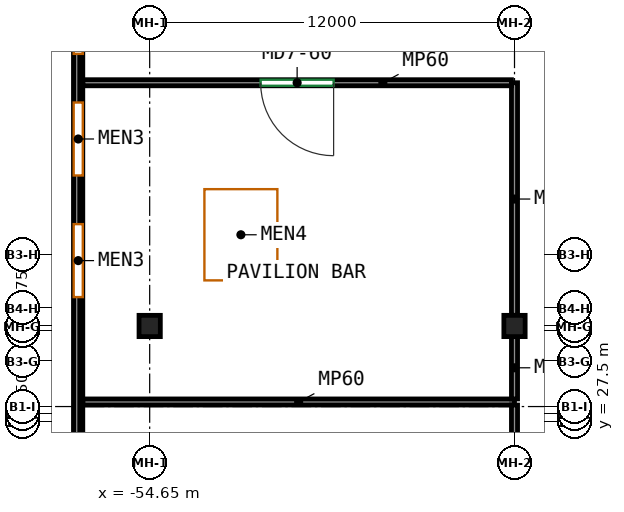
"""IFC4 building model, lengths in metres.
Left out: names, types, materials, properties, quantities, classifications, styles, units other than length and angle.
Written with IfcOpenShell. Run it as: python <this file> out.ifc"""

import sys

from ifc_helpers import new_model, si_unit, direction, frame, frame_2d, origin, origin_2d, place, context, subcontext, project, spatial, rectangle, extrude, source, transform, mapped, element, fill, save


model = new_model("IFC4")
c1 = context("Model", 3, precision=1e-05, world=origin(), true_north=direction((0.0, 1.0)))
c2 = subcontext(c1, "Body", "Model", "MODEL_VIEW")
j1 = project(units=[si_unit("LENGTHUNIT", "METRE"), si_unit("PLANEANGLEUNIT", "RADIAN")], contexts=[c1])
p1 = place(None, origin())
s1 = spatial("IfcSite", under=j1, at=p1, CompositionType="ELEMENT")
p2 = place(p1, origin())
s2 = spatial("IfcBuilding", under=s1, at=p2, CompositionType="ELEMENT")
p3 = place(p2, frame((0.0, 0.0, 22.5)))
s3 = spatial("IfcBuildingStorey", under=s2, at=p3, CompositionType="ELEMENT", Elevation=22.5)
m1 = source(origin(), c2, "Body", "SweptSolid", [
    extrude(rectangle(XDim=0.7, YDim=0.7, at=origin_2d()), origin(), (0.0, 0.0, 1.0), 4.22),
])
for number, where, z_axis, x_axis in (
    (1, (-54.65, 30.65, 0.0), (0.0, 0.0, 1.0), (1.0, 0.0, 0.0)),
    (2, (-42.65, 30.65, 0.0), (0.0, 0.0, 1.0), (1.0, 0.0, 0.0)),
):
    element("IfcColumn", number, at=place(p3, frame(where, z_axis=z_axis, x_axis=x_axis)), inside=s3, PredefinedType="COLUMN", context=c2, shape_type="MappedRepresentation", body=[
        mapped(m1, transform((0.0, 0.0, 0.0))),
    ])
m2 = source(origin(), c2, "Body", "SweptSolid", [
    extrude(rectangle(XDim=100.7, YDim=0.3, at=frame_2d((50.35, 0.0))), origin(), (0.0, 0.0, 1.0), 4.22),
])
p4 = place(p3, frame((-57.0, -43.55, 0.0), z_axis=(0.0, 0.0, 1.0), x_axis=(0.0, 1.0, 0.0)))
e3 = element("IfcWall", 3, at=p4, inside=s3, PredefinedType="SOLIDWALL", context=c2, shape_type="MappedRepresentation", body=[
    mapped(m2, transform((0.0, 0.0, 0.0))),
])
p5 = place(p4, frame((3.15, 0.0, 0.9)))
e4 = element("IfcOpeningElement", 4, at=p5, cuts=e3, PredefinedType="OPENING", context=c2, shape_type="SweptSolid", body=[
    extrude(rectangle(XDim=2.4, YDim=1.8, at=frame_2d((1.2, 0.9))), frame((0.0, 0.16, 0.0), z_axis=(0.0, -1.0, 0.0), x_axis=(1.0, 0.0, 0.0)), (0.0, 0.0, 1.0), 0.32),
])
p6 = place(p4, frame((7.15, 0.0, 0.9)))
e5 = element("IfcOpeningElement", 5, at=p6, cuts=e3, PredefinedType="OPENING", context=c2, shape_type="SweptSolid", body=[
    extrude(rectangle(XDim=2.4, YDim=1.8, at=frame_2d((1.2, 0.9))), frame((0.0, 0.16, 0.0), z_axis=(0.0, -1.0, 0.0), x_axis=(1.0, 0.0, 0.0)), (0.0, 0.0, 1.0), 0.32),
])
p7 = place(p4, frame((11.15, 0.0, 0.9)))
e6 = element("IfcOpeningElement", 6, at=p7, cuts=e3, PredefinedType="OPENING", context=c2, shape_type="SweptSolid", body=[
    extrude(rectangle(XDim=2.4, YDim=1.8, at=frame_2d((1.2, 0.9))), frame((0.0, 0.16, 0.0), z_axis=(0.0, -1.0, 0.0), x_axis=(1.0, 0.0, 0.0)), (0.0, 0.0, 1.0), 0.32),
])
p8 = place(p4, frame((19.15, 0.0, 0.9)))
e7 = element("IfcOpeningElement", 7, at=p8, cuts=e3, PredefinedType="OPENING", context=c2, shape_type="SweptSolid", body=[
    extrude(rectangle(XDim=2.4, YDim=1.8, at=frame_2d((1.2, 0.9))), frame((0.0, 0.16, 0.0), z_axis=(0.0, -1.0, 0.0), x_axis=(1.0, 0.0, 0.0)), (0.0, 0.0, 1.0), 0.32),
])
p9 = place(p4, frame((23.15, 0.0, 0.9)))
e8 = element("IfcOpeningElement", 8, at=p9, cuts=e3, PredefinedType="OPENING", context=c2, shape_type="SweptSolid", body=[
    extrude(rectangle(XDim=2.4, YDim=1.8, at=frame_2d((1.2, 0.9))), frame((0.0, 0.16, 0.0), z_axis=(0.0, -1.0, 0.0), x_axis=(1.0, 0.0, 0.0)), (0.0, 0.0, 1.0), 0.32),
])
p10 = place(p4, frame((27.15, 0.0, 0.9)))
e9 = element("IfcOpeningElement", 9, at=p10, cuts=e3, PredefinedType="OPENING", context=c2, shape_type="SweptSolid", body=[
    extrude(rectangle(XDim=2.4, YDim=1.8, at=frame_2d((1.2, 0.9))), frame((0.0, 0.16, 0.0), z_axis=(0.0, -1.0, 0.0), x_axis=(1.0, 0.0, 0.0)), (0.0, 0.0, 1.0), 0.32),
])
p11 = place(p4, frame((31.15, 0.0, 0.9)))
e10 = element("IfcOpeningElement", 10, at=p11, cuts=e3, PredefinedType="OPENING", context=c2, shape_type="SweptSolid", body=[
    extrude(rectangle(XDim=2.4, YDim=1.8, at=frame_2d((1.2, 0.9))), frame((0.0, 0.16, 0.0), z_axis=(0.0, -1.0, 0.0), x_axis=(1.0, 0.0, 0.0)), (0.0, 0.0, 1.0), 0.32),
])
p12 = place(p4, frame((39.15, 0.0, 0.9)))
e11 = element("IfcOpeningElement", 11, at=p12, cuts=e3, PredefinedType="OPENING", context=c2, shape_type="SweptSolid", body=[
    extrude(rectangle(XDim=2.4, YDim=1.8, at=frame_2d((1.2, 0.9))), frame((0.0, 0.16, 0.0), z_axis=(0.0, -1.0, 0.0), x_axis=(1.0, 0.0, 0.0)), (0.0, 0.0, 1.0), 0.32),
])
p13 = place(p4, frame((43.15, 0.0, 0.9)))
e12 = element("IfcOpeningElement", 12, at=p13, cuts=e3, PredefinedType="OPENING", context=c2, shape_type="SweptSolid", body=[
    extrude(rectangle(XDim=2.4, YDim=1.8, at=frame_2d((1.2, 0.9))), frame((0.0, 0.16, 0.0), z_axis=(0.0, -1.0, 0.0), x_axis=(1.0, 0.0, 0.0)), (0.0, 0.0, 1.0), 0.32),
])
p14 = place(p4, frame((51.15, 0.0, 0.9)))
e13 = element("IfcOpeningElement", 13, at=p14, cuts=e3, PredefinedType="OPENING", context=c2, shape_type="SweptSolid", body=[
    extrude(rectangle(XDim=2.4, YDim=1.8, at=frame_2d((1.2, 0.9))), frame((0.0, 0.16, 0.0), z_axis=(0.0, -1.0, 0.0), x_axis=(1.0, 0.0, 0.0)), (0.0, 0.0, 1.0), 0.32),
])
p15 = place(p4, frame((55.15, 0.0, 0.9)))
e14 = element("IfcOpeningElement", 14, at=p15, cuts=e3, PredefinedType="OPENING", context=c2, shape_type="SweptSolid", body=[
    extrude(rectangle(XDim=2.4, YDim=1.8, at=frame_2d((1.2, 0.9))), frame((0.0, 0.16, 0.0), z_axis=(0.0, -1.0, 0.0), x_axis=(1.0, 0.0, 0.0)), (0.0, 0.0, 1.0), 0.32),
])
p16 = place(p4, frame((59.15, 0.0, 0.9)))
e15 = element("IfcOpeningElement", 15, at=p16, cuts=e3, PredefinedType="OPENING", context=c2, shape_type="SweptSolid", body=[
    extrude(rectangle(XDim=2.4, YDim=1.8, at=frame_2d((1.2, 0.9))), frame((0.0, 0.16, 0.0), z_axis=(0.0, -1.0, 0.0), x_axis=(1.0, 0.0, 0.0)), (0.0, 0.0, 1.0), 0.32),
])
p17 = place(p4, frame((63.15, 0.0, 0.9)))
e16 = element("IfcOpeningElement", 16, at=p17, cuts=e3, PredefinedType="OPENING", context=c2, shape_type="SweptSolid", body=[
    extrude(rectangle(XDim=2.4, YDim=1.8, at=frame_2d((1.2, 0.9))), frame((0.0, 0.16, 0.0), z_axis=(0.0, -1.0, 0.0), x_axis=(1.0, 0.0, 0.0)), (0.0, 0.0, 1.0), 0.32),
])
p18 = place(p4, frame((67.15, 0.0, 0.9)))
e17 = element("IfcOpeningElement", 17, at=p18, cuts=e3, PredefinedType="OPENING", context=c2, shape_type="SweptSolid", body=[
    extrude(rectangle(XDim=2.4, YDim=1.8, at=frame_2d((1.2, 0.9))), frame((0.0, 0.16, 0.0), z_axis=(0.0, -1.0, 0.0), x_axis=(1.0, 0.0, 0.0)), (0.0, 0.0, 1.0), 0.32),
])
p19 = place(p4, frame((75.15, 0.0, 0.9)))
e18 = element("IfcOpeningElement", 18, at=p19, cuts=e3, PredefinedType="OPENING", context=c2, shape_type="SweptSolid", body=[
    extrude(rectangle(XDim=2.4, YDim=1.8, at=frame_2d((1.2, 0.9))), frame((0.0, 0.16, 0.0), z_axis=(0.0, -1.0, 0.0), x_axis=(1.0, 0.0, 0.0)), (0.0, 0.0, 1.0), 0.32),
])
p20 = place(p4, frame((79.15, 0.0, 0.9)))
e19 = element("IfcOpeningElement", 19, at=p20, cuts=e3, PredefinedType="OPENING", context=c2, shape_type="SweptSolid", body=[
    extrude(rectangle(XDim=2.4, YDim=1.8, at=frame_2d((1.2, 0.9))), frame((0.0, 0.16, 0.0), z_axis=(0.0, -1.0, 0.0), x_axis=(1.0, 0.0, 0.0)), (0.0, 0.0, 1.0), 0.32),
])
p21 = place(p4, frame((83.15, 0.0, 0.9)))
e20 = element("IfcOpeningElement", 20, at=p21, cuts=e3, PredefinedType="OPENING", context=c2, shape_type="SweptSolid", body=[
    extrude(rectangle(XDim=2.4, YDim=1.8, at=frame_2d((1.2, 0.9))), frame((0.0, 0.16, 0.0), z_axis=(0.0, -1.0, 0.0), x_axis=(1.0, 0.0, 0.0)), (0.0, 0.0, 1.0), 0.32),
])
p22 = place(p4, frame((87.15, 0.0, 0.9)))
e21 = element("IfcOpeningElement", 21, at=p22, cuts=e3, PredefinedType="OPENING", context=c2, shape_type="SweptSolid", body=[
    extrude(rectangle(XDim=2.4, YDim=1.8, at=frame_2d((1.2, 0.9))), frame((0.0, 0.16, 0.0), z_axis=(0.0, -1.0, 0.0), x_axis=(1.0, 0.0, 0.0)), (0.0, 0.0, 1.0), 0.32),
])
p23 = place(p4, frame((91.15, 0.0, 0.9)))
e22 = element("IfcOpeningElement", 22, at=p23, cuts=e3, PredefinedType="OPENING", context=c2, shape_type="SweptSolid", body=[
    extrude(rectangle(XDim=2.4, YDim=1.8, at=frame_2d((1.2, 0.9))), frame((0.0, 0.16, 0.0), z_axis=(0.0, -1.0, 0.0), x_axis=(1.0, 0.0, 0.0)), (0.0, 0.0, 1.0), 0.32),
])
p24 = place(p4, frame((95.15, 0.0, 0.9)))
e23 = element("IfcOpeningElement", 23, at=p24, cuts=e3, PredefinedType="OPENING", context=c2, shape_type="SweptSolid", body=[
    extrude(rectangle(XDim=2.4, YDim=1.8, at=frame_2d((1.2, 0.9))), frame((0.0, 0.16, 0.0), z_axis=(0.0, -1.0, 0.0), x_axis=(1.0, 0.0, 0.0)), (0.0, 0.0, 1.0), 0.32),
])
m3 = source(origin(), c2, "Body", "SweptSolid", [
    extrude(rectangle(XDim=100.8, YDim=0.2, at=frame_2d((50.4, 0.0))), origin(), (0.0, 0.0, 1.0), 1.1),
])
p25 = place(p3, frame((-57.05, -43.65, 4.5), z_axis=(0.0, 0.0, 1.0), x_axis=(0.0, 1.0, 0.0)))
e24 = element("IfcWall", 24, at=p25, inside=s3, PredefinedType="PARAPET", context=c2, shape_type="MappedRepresentation", body=[
    mapped(m3, transform((0.0, 0.0, 0.0))),
])
m4 = source(origin(), c2, "Body", "SweptSolid", [
    extrude(rectangle(XDim=14.2, YDim=0.2, at=frame_2d((7.1, 0.0))), origin(), (0.0, 0.0, 1.0), 3.42),
])
p26 = place(p3, frame((-56.85, 28.15, 0.0), z_axis=(0.0, 0.0, 1.0), x_axis=(1.0, 0.0, 0.0)))
e25 = element("IfcWall", 25, at=p26, inside=s3, PredefinedType="PARTITIONING", context=c2, shape_type="MappedRepresentation", body=[
    mapped(m4, transform((0.0, 0.0, 0.0))),
])
m5 = source(origin(), c2, "Body", "SweptSolid", [
    extrude(rectangle(XDim=10.35, YDim=0.2, at=frame_2d((5.175, 0.0))), origin(), (0.0, 0.0, 1.0), 3.42),
])
p27 = place(p3, frame((-42.65, 17.7, 0.0), z_axis=(0.0, 0.0, 1.0), x_axis=(0.0, 1.0, 0.0)))
e26 = element("IfcWall", 26, at=p27, inside=s3, PredefinedType="PARTITIONING", context=c2, shape_type="MappedRepresentation", body=[
    mapped(m5, transform((0.0, 0.0, 0.0))),
])
p28 = place(p27, frame((3.975, 0.0, 0.0)))
e27 = element("IfcOpeningElement", 27, at=p28, cuts=e26, PredefinedType="OPENING", context=c2, shape_type="SweptSolid", body=[
    extrude(rectangle(XDim=2.4, YDim=2.4, at=frame_2d((1.2, 1.2))), frame((0.0, 0.11, 0.0), z_axis=(0.0, -1.0, 0.0), x_axis=(1.0, 0.0, 0.0)), (0.0, 0.0, 1.0), 0.22),
])
m6 = source(origin(), c2, "Body", "SweptSolid", [
    extrude(rectangle(XDim=2.05, YDim=0.2, at=frame_2d((1.025, 0.0))), origin(), (0.0, 0.0, 1.0), 3.42),
])
p29 = place(p3, frame((-42.65, 28.25, 0.0), z_axis=(0.0, 0.0, 1.0), x_axis=(0.0, 1.0, 0.0)))
e28 = element("IfcWall", 28, at=p29, inside=s3, PredefinedType="PARTITIONING", context=c2, shape_type="MappedRepresentation", body=[
    mapped(m6, transform((0.0, 0.0, 0.0))),
])
m7 = source(origin(), c2, "Body", "SweptSolid", [
    extrude(rectangle(XDim=7.65, YDim=0.2, at=frame_2d((3.825, 0.0))), origin(), (0.0, 0.0, 1.0), 3.42),
])
p30 = place(p3, frame((-42.65, 31.0, 0.0), z_axis=(0.0, 0.0, 1.0), x_axis=(0.0, 1.0, 0.0)))
e29 = element("IfcWall", 29, at=p30, inside=s3, PredefinedType="PARTITIONING", context=c2, shape_type="MappedRepresentation", body=[
    mapped(m7, transform((0.0, 0.0, 0.0))),
])
m8 = source(origin(), c2, "Body", "SweptSolid", [
    extrude(rectangle(XDim=14.1, YDim=0.2, at=frame_2d((7.05, 0.0))), origin(), (0.0, 0.0, 1.0), 3.42),
])
p31 = place(p3, frame((-42.75, 38.65, 0.0), z_axis=(0.0, 0.0, 1.0), x_axis=(-1.0, 0.0, 0.0)))
e30 = element("IfcWall", 30, at=p31, inside=s3, PredefinedType="PARTITIONING", context=c2, shape_type="MappedRepresentation", body=[
    mapped(m8, transform((0.0, 0.0, 0.0))),
])
p32 = place(p31, frame((5.85, 0.0, 0.0)))
e31 = element("IfcOpeningElement", 31, at=p32, cuts=e30, PredefinedType="OPENING", context=c2, shape_type="SweptSolid", body=[
    extrude(rectangle(XDim=2.4, YDim=2.4, at=frame_2d((1.2, 1.2))), frame((0.0, 0.11, 0.0), z_axis=(0.0, -1.0, 0.0), x_axis=(1.0, 0.0, 0.0)), (0.0, 0.0, 1.0), 0.22),
])
p33 = place(p19, origin())
e32 = element("IfcWindow", 32, at=p33, inside=s3, PartitioningType="SINGLE_PANEL", PredefinedType="WINDOW", context=c2, shape_type="SweptSolid", body=[
    extrude(rectangle(XDim=2.4, YDim=1.8, at=frame_2d((1.2, 0.9))), frame((0.0, 0.03, 0.0), z_axis=(0.0, -1.0, 0.0), x_axis=(1.0, 0.0, 0.0)), (0.0, 0.0, 1.0), 0.06),
])
fill(e18, e32)
p34 = place(p20, origin())
e33 = element("IfcWindow", 33, at=p34, inside=s3, PartitioningType="SINGLE_PANEL", PredefinedType="WINDOW", context=c2, shape_type="SweptSolid", body=[
    extrude(rectangle(XDim=2.4, YDim=1.8, at=frame_2d((1.2, 0.9))), frame((0.0, 0.03, 0.0), z_axis=(0.0, -1.0, 0.0), x_axis=(1.0, 0.0, 0.0)), (0.0, 0.0, 1.0), 0.06),
])
fill(e19, e33)
p35 = place(p21, origin())
e34 = element("IfcWindow", 34, at=p35, inside=s3, PartitioningType="SINGLE_PANEL", PredefinedType="WINDOW", context=c2, shape_type="SweptSolid", body=[
    extrude(rectangle(XDim=2.4, YDim=1.8, at=frame_2d((1.2, 0.9))), frame((0.0, 0.03, 0.0), z_axis=(0.0, -1.0, 0.0), x_axis=(1.0, 0.0, 0.0)), (0.0, 0.0, 1.0), 0.06),
])
fill(e20, e34)
p36 = place(p2, frame((0.0, 0.0, 27.0)))
p37 = place(p36, frame((0.0, 0.0, -0.28)))
p38 = place(p37, frame((-51.65, 33.65, 0.0)))
p39 = place(p38, frame((0.0, 0.0, 0.23)))
e35 = element("IfcWindow", 35, at=p39, inside=s3, PartitioningType="SINGLE_PANEL", PredefinedType="SKYLIGHT", context=c2, shape_type="SweptSolid", body=[
    extrude(rectangle(XDim=2.4, YDim=3.0, at=origin_2d()), origin(), (0.0, 0.0, 1.0), 0.05),
])
p40 = place(p32, origin())
e36 = element("IfcDoor", 36, at=p40, inside=s3, OperationType="DOUBLE_DOOR_SINGLE_SWING", PredefinedType="DOOR", context=c2, shape_type="SweptSolid", body=[
    extrude(rectangle(XDim=2.4, YDim=2.4, at=frame_2d((1.2, 1.2))), frame((0.0, 0.025, 0.0), z_axis=(0.0, -1.0, 0.0), x_axis=(1.0, 0.0, 0.0)), (0.0, 0.0, 1.0), 0.05),
])
fill(e31, e36)
save(model, sys.argv[1])
